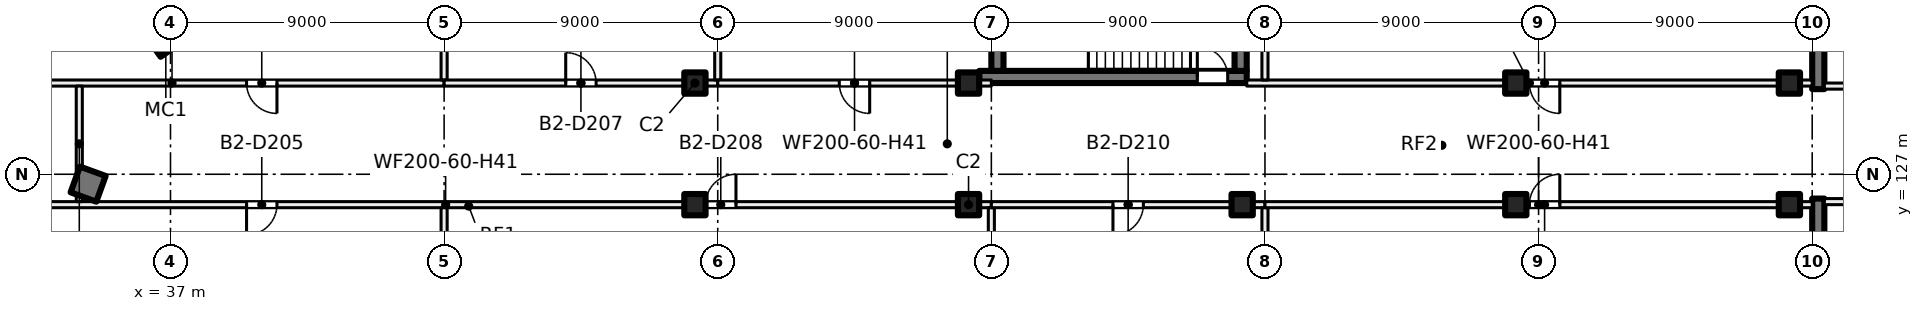
"""IFC4 building model, lengths in metres.
Left out: names, types, materials, properties, quantities, classifications, styles, units other than length and angle.
Written with IfcOpenShell. Run it as: python <this file> out.ifc"""

import sys

from ifc_helpers import new_model, si_unit, direction, frame, frame_2d, origin, origin_2d, place, context, subcontext, project, spatial, rectangle, hollow_rectangle, extrude, element, fill, save


model = new_model("IFC4")
c1 = context("Model", 3, precision=1e-05, world=origin(), true_north=direction((0.0, 1.0)))
c2 = subcontext(c1, "Body", "Model", "MODEL_VIEW")
j1 = project(units=[si_unit("LENGTHUNIT", "METRE"), si_unit("PLANEANGLEUNIT", "RADIAN")], contexts=[c1])
p1 = place(None, origin())
s1 = spatial("IfcSite", under=j1, at=p1, CompositionType="ELEMENT")
p2 = place(p1, origin())
s2 = spatial("IfcBuilding", under=s1, at=p2, CompositionType="ELEMENT")
p3 = place(p2, frame((0.0, 0.0, -9.0)))
s3 = spatial("IfcBuildingStorey", under=s2, at=p3, CompositionType="ELEMENT", Elevation=-9.0)
p4 = place(p3, frame((36.846, 131.838, 0.0), z_axis=(0.0, 0.0, 1.0), x_axis=(0.573576436351, -0.819152044289, 0.0)))
e1 = element("IfcColumn", 1, at=p4, inside=s3, PredefinedType="COLUMN", context=c2, shape_type="SweptSolid", body=[
    extrude(hollow_rectangle(XDim=1.4, YDim=1.4, WallThickness=0.04, at=origin_2d()), origin(), (0.0, 0.0, 1.0), 4.5),
])
for number, where, z_axis, x_axis in (
    (2, (54.25, 130.0, 0.0), (0.0, 0.0, 1.0), (1.0, 0.0, 0.0)),
    (3, (63.25, 130.0, 0.0), (0.0, 0.0, 1.0), (1.0, 0.0, 0.0)),
    (4, (81.25, 130.0, 0.0), (0.0, 0.0, 1.0), (1.0, 0.0, 0.0)),
    (5, (90.25, 130.0, 0.0), (0.0, 0.0, 1.0), (1.0, 0.0, 0.0)),
    (6, (54.25, 126.0, 0.0), (0.0, 0.0, 1.0), (1.0, 0.0, 0.0)),
    (7, (63.25, 126.0, 0.0), (0.0, 0.0, 1.0), (1.0, 0.0, 0.0)),
    (8, (72.25, 126.0, 0.0), (0.0, 0.0, 1.0), (1.0, 0.0, 0.0)),
    (9, (81.25, 126.0, 0.0), (0.0, 0.0, 1.0), (1.0, 0.0, 0.0)),
    (10, (90.25, 126.0, 0.0), (0.0, 0.0, 1.0), (1.0, 0.0, 0.0)),
):
    element("IfcColumn", number, at=place(p3, frame(where, z_axis=z_axis, x_axis=x_axis)), inside=s3, PredefinedType="COLUMN", context=c2, shape_type="SweptSolid", body=[
        extrude(rectangle(XDim=0.7, YDim=0.7, at=origin_2d()), origin(), (0.0, 0.0, 1.0), 4.5),
    ])
p5 = place(p3, frame((34.291, 126.675, 0.0), z_axis=(0.0, 0.0, 1.0), x_axis=(-0.342020143326, -0.939692620786, 0.0)))
e11 = element("IfcColumn", 11, at=p5, inside=s3, PredefinedType="COLUMN", context=c2, shape_type="SweptSolid", body=[
    extrude(rectangle(XDim=0.9, YDim=0.9, at=origin_2d()), origin(), (0.0, 0.0, 1.0), 4.5),
])
for number, where, z_axis, x_axis in (
    (12, (91.2, 138.4, 0.0), (0.0, 0.0, 1.0), (0.0, -1.0, 0.0)),
    (13, (91.2, 126.2, 0.0), (0.0, 0.0, 1.0), (0.0, -1.0, 0.0)),
):
    element("IfcWall", number, at=place(p3, frame(where, z_axis=z_axis, x_axis=x_axis)), inside=s3, PredefinedType="SHEAR", context=c2, shape_type="SweptSolid", body=[
        extrude(rectangle(XDim=8.6, YDim=0.4, at=frame_2d((4.3, 0.0))), origin(), (0.0, 0.0, 1.0), 4.5),
    ])
p6 = place(p3, frame((63.6, 130.2, 0.0), z_axis=(0.0, 0.0, 1.0), x_axis=(1.0, 0.0, 0.0)))
e14 = element("IfcWall", 14, at=p6, inside=s3, PredefinedType="SHEAR", context=c2, shape_type="SweptSolid", body=[
    extrude(rectangle(XDim=8.8, YDim=0.4, at=frame_2d((4.4, 0.0))), origin(), (0.0, 0.0, 1.0), 4.5),
])
p7 = place(p6, frame((7.175, 0.0, 0.0)))
e15 = element("IfcOpeningElement", 15, at=p7, cuts=e14, PredefinedType="OPENING", context=c2, shape_type="SweptSolid", body=[
    extrude(rectangle(XDim=1.0, YDim=2.1, at=frame_2d((0.5, 1.05))), frame((0.0, 0.21, 0.0), z_axis=(0.0, -1.0, 0.0), x_axis=(1.0, 0.0, 0.0)), (0.0, 0.0, 1.0), 0.42),
])
for number, where, z_axis, x_axis in (
    (16, (64.2, 130.4, 0.0), (0.0, 0.0, 1.0), (0.0, 1.0, 0.0)),
    (17, (72.2, 130.4, 0.0), (0.0, 0.0, 1.0), (0.0, 1.0, 0.0)),
):
    element("IfcWall", number, at=place(p3, frame(where, z_axis=z_axis, x_axis=x_axis)), inside=s3, PredefinedType="SHEAR", context=c2, shape_type="SweptSolid", body=[
        extrude(rectangle(XDim=3.0, YDim=0.4, at=frame_2d((1.5, 0.0))), origin(), (0.0, 0.0, 1.0), 4.5),
    ])
p8 = place(p3, frame((95.2, 126.1, 0.0), z_axis=(0.0, 0.0, 1.0), x_axis=(-1.0, 0.0, 0.0)))
e18 = element("IfcWall", 18, at=p8, inside=s3, PredefinedType="PARTITIONING", context=c2, shape_type="SweptSolid", body=[
    extrude(rectangle(XDim=3.8, YDim=0.2, at=frame_2d((1.9, 0.0))), origin(), (0.0, 0.0, 1.0), 4.125),
])
p9 = place(p8, frame((0.3, 0.0, 0.0)))
e19 = element("IfcOpeningElement", 19, at=p9, cuts=e18, PredefinedType="OPENING", context=c2, shape_type="SweptSolid", body=[
    extrude(rectangle(XDim=1.2, YDim=2.1, at=frame_2d((0.6, 1.05))), frame((0.0, 0.11, 0.0), z_axis=(0.0, -1.0, 0.0), x_axis=(1.0, 0.0, 0.0)), (0.0, 0.0, 1.0), 0.22),
])
p10 = place(p3, frame((91.4, 129.9, 0.0), z_axis=(0.0, 0.0, 1.0), x_axis=(1.0, 0.0, 0.0)))
e20 = element("IfcWall", 20, at=p10, inside=s3, PredefinedType="PARTITIONING", context=c2, shape_type="SweptSolid", body=[
    extrude(rectangle(XDim=3.8, YDim=0.2, at=frame_2d((1.9, 0.0))), origin(), (0.0, 0.0, 1.0), 4.125),
])
p11 = place(p10, frame((2.3, 0.0, 0.0)))
e21 = element("IfcOpeningElement", 21, at=p11, cuts=e20, PredefinedType="OPENING", context=c2, shape_type="SweptSolid", body=[
    extrude(rectangle(XDim=1.2, YDim=2.1, at=frame_2d((0.6, 1.05))), frame((0.0, 0.11, 0.0), z_axis=(0.0, -1.0, 0.0), x_axis=(1.0, 0.0, 0.0)), (0.0, 0.0, 1.0), 0.22),
])
p12 = place(p3, frame((64.0, 126.0, 0.0), z_axis=(0.0, 0.0, 1.0), x_axis=(-1.0, 0.0, 0.0)))
e22 = element("IfcWall", 22, at=p12, inside=s3, PredefinedType="PARTITIONING", context=c2, shape_type="SweptSolid", body=[
    extrude(rectangle(XDim=35.9, YDim=0.2, at=frame_2d((17.95, 0.0))), origin(), (0.0, 0.0, 1.0), 4.125),
])
p13 = place(p12, frame((23.498, 0.0, 0.0)))
e23 = element("IfcOpeningElement", 23, at=p13, cuts=e22, PredefinedType="OPENING", context=c2, shape_type="SweptSolid", body=[
    extrude(rectangle(XDim=1.0, YDim=2.1, at=frame_2d((0.5, 1.05))), frame((0.0, 0.11, 0.0), z_axis=(0.0, -1.0, 0.0), x_axis=(1.0, 0.0, 0.0)), (0.0, 0.0, 1.0), 0.22),
])
p14 = place(p12, frame((8.4, 0.0, 0.0)))
e24 = element("IfcOpeningElement", 24, at=p14, cuts=e22, PredefinedType="OPENING", context=c2, shape_type="SweptSolid", body=[
    extrude(rectangle(XDim=1.0, YDim=2.1, at=frame_2d((0.5, 1.05))), frame((0.0, 0.11, 0.0), z_axis=(0.0, -1.0, 0.0), x_axis=(1.0, 0.0, 0.0)), (0.0, 0.0, 1.0), 0.22),
])
p15 = place(p3, frame((28.1, 130.0, 0.0), z_axis=(0.0, 0.0, 1.0), x_axis=(1.0, 0.0, 0.0)))
e25 = element("IfcWall", 25, at=p15, inside=s3, PredefinedType="PARTITIONING", context=c2, shape_type="SweptSolid", body=[
    extrude(rectangle(XDim=17.9, YDim=0.2, at=frame_2d((8.95, 0.0))), origin(), (0.0, 0.0, 1.0), 4.125),
])
p16 = place(p15, frame((11.402, 0.0, 0.0)))
e26 = element("IfcOpeningElement", 26, at=p16, cuts=e25, PredefinedType="OPENING", context=c2, shape_type="SweptSolid", body=[
    extrude(rectangle(XDim=1.0, YDim=2.1, at=frame_2d((0.5, 1.05))), frame((0.0, 0.11, 0.0), z_axis=(0.0, -1.0, 0.0), x_axis=(1.0, 0.0, 0.0)), (0.0, 0.0, 1.0), 0.22),
])
p17 = place(p3, frame((34.0, 126.1, 0.0), z_axis=(0.0, 0.0, 1.0), x_axis=(0.0, 1.0, 0.0)))
e27 = element("IfcWall", 27, at=p17, inside=s3, PredefinedType="PARTITIONING", context=c2, shape_type="SweptSolid", body=[
    extrude(rectangle(XDim=3.8, YDim=0.2, at=frame_2d((1.9, 0.0))), origin(), (0.0, 0.0, 1.0), 4.125),
])
p18 = place(p3, frame((46.0, 109.1, 0.0), z_axis=(0.0, 0.0, 1.0), x_axis=(0.0, 1.0, 0.0)))
e28 = element("IfcWall", 28, at=p18, inside=s3, PredefinedType="PARTITIONING", context=c2, shape_type="SweptSolid", body=[
    extrude(rectangle(XDim=16.8, YDim=0.2, at=frame_2d((8.4, 0.0))), origin(), (0.0, 0.0, 1.0), 4.125),
])
p19 = place(p3, frame((46.0, 130.1, 0.0), z_axis=(0.0, 0.0, 1.0), x_axis=(0.0, 1.0, 0.0)))
e29 = element("IfcWall", 29, at=p19, inside=s3, PredefinedType="PARTITIONING", context=c2, shape_type="SweptSolid", body=[
    extrude(rectangle(XDim=16.24, YDim=0.2, at=frame_2d((8.12, 0.0))), origin(), (0.0, 0.0, 1.0), 4.125),
])
p20 = place(p3, frame((46.0, 130.0, 0.0), z_axis=(0.0, 0.0, 1.0), x_axis=(1.0, 0.0, 0.0)))
e30 = element("IfcWall", 30, at=p20, inside=s3, PredefinedType="PARTITIONING", context=c2, shape_type="SweptSolid", body=[
    extrude(rectangle(XDim=9.0, YDim=0.2, at=frame_2d((4.5, 0.0))), origin(), (0.0, 0.0, 1.0), 4.125),
])
p21 = place(p20, frame((4.0, 0.0, 0.0)))
e31 = element("IfcOpeningElement", 31, at=p21, cuts=e30, PredefinedType="OPENING", context=c2, shape_type="SweptSolid", body=[
    extrude(rectangle(XDim=1.0, YDim=2.1, at=frame_2d((0.5, 1.05))), frame((0.0, 0.11, 0.0), z_axis=(0.0, -1.0, 0.0), x_axis=(1.0, 0.0, 0.0)), (0.0, 0.0, 1.0), 0.22),
])
p22 = place(p3, frame((55.0, 130.1, 0.0), z_axis=(0.0, 0.0, 1.0), x_axis=(0.0, 1.0, 0.0)))
e32 = element("IfcWall", 32, at=p22, inside=s3, PredefinedType="PARTITIONING", context=c2, shape_type="SweptSolid", body=[
    extrude(rectangle(XDim=16.25, YDim=0.2, at=frame_2d((8.125, 0.0))), origin(), (0.0, 0.0, 1.0), 4.125),
])
p23 = place(p3, frame((55.0, 130.0, 0.0), z_axis=(0.0, 0.0, 1.0), x_axis=(1.0, 0.0, 0.0)))
e33 = element("IfcWall", 33, at=p23, inside=s3, PredefinedType="PARTITIONING", context=c2, shape_type="SweptSolid", body=[
    extrude(rectangle(XDim=9.0, YDim=0.2, at=frame_2d((4.5, 0.0))), origin(), (0.0, 0.0, 1.0), 4.125),
])
p24 = place(p23, frame((3.998, 0.0, 0.0)))
e34 = element("IfcOpeningElement", 34, at=p24, cuts=e33, PredefinedType="OPENING", context=c2, shape_type="SweptSolid", body=[
    extrude(rectangle(XDim=1.0, YDim=2.1, at=frame_2d((0.5, 1.05))), frame((0.0, 0.11, 0.0), z_axis=(0.0, -1.0, 0.0), x_axis=(1.0, 0.0, 0.0)), (0.0, 0.0, 1.0), 0.22),
])
p25 = place(p3, frame((64.0, 109.1, 0.0), z_axis=(0.0, 0.0, 1.0), x_axis=(0.0, 1.0, 0.0)))
e35 = element("IfcWall", 35, at=p25, inside=s3, PredefinedType="PARTITIONING", context=c2, shape_type="SweptSolid", body=[
    extrude(rectangle(XDim=16.8, YDim=0.2, at=frame_2d((8.4, 0.0))), origin(), (0.0, 0.0, 1.0), 4.125),
])
p26 = place(p3, frame((73.0, 126.0, 0.0), z_axis=(0.0, 0.0, 1.0), x_axis=(-1.0, 0.0, 0.0)))
e36 = element("IfcWall", 36, at=p26, inside=s3, PredefinedType="PARTITIONING", context=c2, shape_type="SweptSolid", body=[
    extrude(rectangle(XDim=9.0, YDim=0.2, at=frame_2d((4.5, 0.0))), origin(), (0.0, 0.0, 1.0), 4.125),
])
p27 = place(p26, frame((4.0, 0.0, 0.0)))
e37 = element("IfcOpeningElement", 37, at=p27, cuts=e36, PredefinedType="OPENING", context=c2, shape_type="SweptSolid", body=[
    extrude(rectangle(XDim=1.0, YDim=2.1, at=frame_2d((0.5, 1.05))), frame((0.0, 0.11, 0.0), z_axis=(0.0, -1.0, 0.0), x_axis=(1.0, 0.0, 0.0)), (0.0, 0.0, 1.0), 0.22),
])
p28 = place(p3, frame((72.4, 130.0, 0.0), z_axis=(0.0, 0.0, 1.0), x_axis=(1.0, 0.0, 0.0)))
e38 = element("IfcWall", 38, at=p28, inside=s3, PredefinedType="PARTITIONING", context=c2, shape_type="SweptSolid", body=[
    extrude(rectangle(XDim=18.6, YDim=0.2, at=frame_2d((9.3, 0.0))), origin(), (0.0, 0.0, 1.0), 4.125),
])
p29 = place(p28, frame((9.298, 0.0, 0.0)))
e39 = element("IfcOpeningElement", 39, at=p29, cuts=e38, PredefinedType="OPENING", context=c2, shape_type="SweptSolid", body=[
    extrude(rectangle(XDim=1.0, YDim=2.1, at=frame_2d((0.5, 1.05))), frame((0.0, 0.11, 0.0), z_axis=(0.0, -1.0, 0.0), x_axis=(1.0, 0.0, 0.0)), (0.0, 0.0, 1.0), 0.22),
])
p30 = place(p3, frame((73.0, 109.1, 0.0), z_axis=(0.0, 0.0, 1.0), x_axis=(0.0, 1.0, 0.0)))
e40 = element("IfcWall", 40, at=p30, inside=s3, PredefinedType="PARTITIONING", context=c2, shape_type="SweptSolid", body=[
    extrude(rectangle(XDim=16.8, YDim=0.2, at=frame_2d((8.4, 0.0))), origin(), (0.0, 0.0, 1.0), 4.125),
])
p31 = place(p3, frame((91.0, 126.0, 0.0), z_axis=(0.0, 0.0, 1.0), x_axis=(-1.0, 0.0, 0.0)))
e41 = element("IfcWall", 41, at=p31, inside=s3, PredefinedType="PARTITIONING", context=c2, shape_type="SweptSolid", body=[
    extrude(rectangle(XDim=18.0, YDim=0.2, at=frame_2d((9.0, 0.0))), origin(), (0.0, 0.0, 1.0), 4.125),
])
p32 = place(p31, frame((8.302, 0.0, 0.0)))
e42 = element("IfcOpeningElement", 42, at=p32, cuts=e41, PredefinedType="OPENING", context=c2, shape_type="SweptSolid", body=[
    extrude(rectangle(XDim=1.0, YDim=2.1, at=frame_2d((0.5, 1.05))), frame((0.0, 0.11, 0.0), z_axis=(0.0, -1.0, 0.0), x_axis=(1.0, 0.0, 0.0)), (0.0, 0.0, 1.0), 0.22),
])
p33 = place(p3, frame((73.0, 130.1, 0.0), z_axis=(0.0, 0.0, 1.0), x_axis=(0.0, 1.0, 0.0)))
e43 = element("IfcWall", 43, at=p33, inside=s3, PredefinedType="PARTITIONING", context=c2, shape_type="SweptSolid", body=[
    extrude(rectangle(XDim=16.25, YDim=0.2, at=frame_2d((8.125, 0.0))), origin(), (0.0, 0.0, 1.0), 4.125),
])
p34 = place(p7, origin())
e44 = element("IfcDoor", 44, at=p34, inside=s3, OperationType="SINGLE_SWING_LEFT", PredefinedType="DOOR", context=c2, shape_type="SweptSolid", body=[
    extrude(rectangle(XDim=1.0, YDim=2.1, at=frame_2d((0.5, 1.05))), frame((0.0, 0.025, 0.0), z_axis=(0.0, -1.0, 0.0), x_axis=(1.0, 0.0, 0.0)), (0.0, 0.0, 1.0), 0.05),
])
fill(e15, e44)
p35 = place(p13, origin())
e45 = element("IfcDoor", 45, at=p35, inside=s3, OperationType="SINGLE_SWING_RIGHT", PredefinedType="DOOR", context=c2, shape_type="SweptSolid", body=[
    extrude(rectangle(XDim=1.0, YDim=2.1, at=frame_2d((0.5, 1.05))), frame((0.0, 0.025, 0.0), z_axis=(0.0, -1.0, 0.0), x_axis=(1.0, 0.0, 0.0)), (0.0, 0.0, 1.0), 0.05),
])
fill(e23, e45)
p36 = place(p16, origin())
e46 = element("IfcDoor", 46, at=p36, inside=s3, OperationType="SINGLE_SWING_RIGHT", PredefinedType="DOOR", context=c2, shape_type="SweptSolid", body=[
    extrude(rectangle(XDim=1.0, YDim=2.1, at=frame_2d((0.5, 1.05))), frame((0.0, 0.025, 0.0), z_axis=(0.0, -1.0, 0.0), x_axis=(1.0, 0.0, 0.0)), (0.0, 0.0, 1.0), 0.05),
])
fill(e26, e46)
p37 = place(p21, origin())
e47 = element("IfcDoor", 47, at=p37, inside=s3, OperationType="SINGLE_SWING_LEFT", PredefinedType="DOOR", context=c2, shape_type="SweptSolid", body=[
    extrude(rectangle(XDim=1.0, YDim=2.1, at=frame_2d((0.5, 1.05))), frame((0.0, 0.025, 0.0), z_axis=(0.0, -1.0, 0.0), x_axis=(1.0, 0.0, 0.0)), (0.0, 0.0, 1.0), 0.05),
])
fill(e31, e47)
p38 = place(p14, origin())
e48 = element("IfcDoor", 48, at=p38, inside=s3, OperationType="SINGLE_SWING_LEFT", PredefinedType="DOOR", context=c2, shape_type="SweptSolid", body=[
    extrude(rectangle(XDim=1.0, YDim=2.1, at=frame_2d((0.5, 1.05))), frame((0.0, 0.025, 0.0), z_axis=(0.0, -1.0, 0.0), x_axis=(1.0, 0.0, 0.0)), (0.0, 0.0, 1.0), 0.05),
])
fill(e24, e48)
p39 = place(p24, origin())
e49 = element("IfcDoor", 49, at=p39, inside=s3, OperationType="SINGLE_SWING_RIGHT", PredefinedType="DOOR", context=c2, shape_type="SweptSolid", body=[
    extrude(rectangle(XDim=1.0, YDim=2.1, at=frame_2d((0.5, 1.05))), frame((0.0, 0.025, 0.0), z_axis=(0.0, -1.0, 0.0), x_axis=(1.0, 0.0, 0.0)), (0.0, 0.0, 1.0), 0.05),
])
fill(e34, e49)
p40 = place(p27, origin())
e50 = element("IfcDoor", 50, at=p40, inside=s3, OperationType="SINGLE_SWING_RIGHT", PredefinedType="DOOR", context=c2, shape_type="SweptSolid", body=[
    extrude(rectangle(XDim=1.0, YDim=2.1, at=frame_2d((0.5, 1.05))), frame((0.0, 0.025, 0.0), z_axis=(0.0, -1.0, 0.0), x_axis=(1.0, 0.0, 0.0)), (0.0, 0.0, 1.0), 0.05),
])
fill(e37, e50)
p41 = place(p32, origin())
e51 = element("IfcDoor", 51, at=p41, inside=s3, OperationType="SINGLE_SWING_LEFT", PredefinedType="DOOR", context=c2, shape_type="SweptSolid", body=[
    extrude(rectangle(XDim=1.0, YDim=2.1, at=frame_2d((0.5, 1.05))), frame((0.0, 0.025, 0.0), z_axis=(0.0, -1.0, 0.0), x_axis=(1.0, 0.0, 0.0)), (0.0, 0.0, 1.0), 0.05),
])
fill(e42, e51)
p42 = place(p29, origin())
e52 = element("IfcDoor", 52, at=p42, inside=s3, OperationType="SINGLE_SWING_RIGHT", PredefinedType="DOOR", context=c2, shape_type="SweptSolid", body=[
    extrude(rectangle(XDim=1.0, YDim=2.1, at=frame_2d((0.5, 1.05))), frame((0.0, 0.025, 0.0), z_axis=(0.0, -1.0, 0.0), x_axis=(1.0, 0.0, 0.0)), (0.0, 0.0, 1.0), 0.05),
])
fill(e39, e52)
save(model, sys.argv[1])
